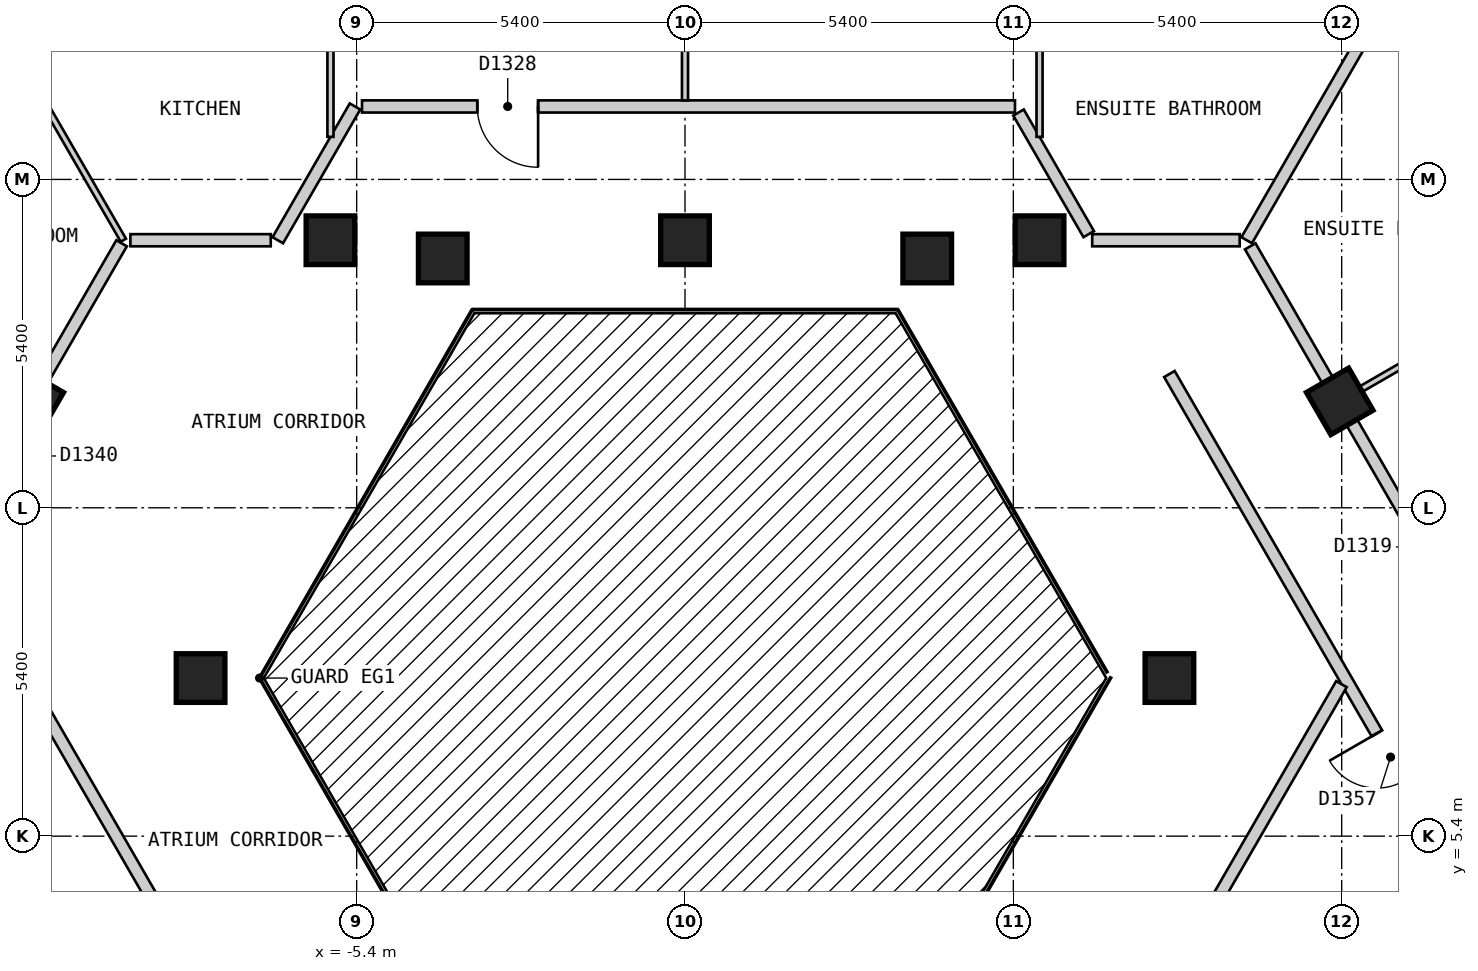
"""IFC4 building model, lengths in metres.
Left out: names, types, materials, properties, quantities, classifications, styles, units other than length and angle.
Written with IfcOpenShell. Run it as: python <this file> out.ifc"""

import sys

from ifc_helpers import new_model, si_unit, direction, frame, frame_2d, origin, origin_2d, place, context, subcontext, project, spatial, rectangle, extrude, element, fill, save


model = new_model("IFC4")
c1 = context("Model", 3, precision=1e-05, world=origin(), true_north=direction((0.0, 1.0)))
c2 = subcontext(c1, "Body", "Model", "MODEL_VIEW")
j1 = project(units=[si_unit("LENGTHUNIT", "METRE"), si_unit("PLANEANGLEUNIT", "RADIAN")], contexts=[c1])
p1 = place(None, origin())
s1 = spatial("IfcSite", under=j1, at=p1, CompositionType="ELEMENT")
p2 = place(p1, origin())
s2 = spatial("IfcBuilding", under=s1, at=p2, CompositionType="ELEMENT")
p3 = place(p2, frame((0.0, 0.0, 135.6)))
s3 = spatial("IfcBuildingStorey", under=s2, at=p3, CompositionType="ELEMENT", Elevation=135.6)
for number, where, z_axis, x_axis in (
    (1, (7.967, 8.0, 0.0), (0.0, 0.0, 1.0), (1.0, 0.0, 0.0)),
    (2, (10.768, 12.55, 0.0), (0.0, 0.0, 1.0), (-0.5, 0.866, 0.0)),
    (3, (5.831, 15.2, 0.0), (0.0, 0.0, 1.0), (-1.0, 0.0, 0.0)),
    (4, (3.984, 14.9, 0.0), (0.0, 0.0, 1.0), (1.0, 0.0, 0.0)),
    (5, (0.0, 15.2, 0.0), (0.0, 0.0, 1.0), (-1.0, 0.0, 0.0)),
    (6, (-3.984, 14.9, 0.0), (0.0, 0.0, 1.0), (1.0, 0.0, 0.0)),
    (7, (-5.831, 15.2, 0.0), (0.0, 0.0, 1.0), (-1.0, 0.0, 0.0)),
    (8, (-10.768, 12.55, 0.0), (0.0, 0.0, 1.0), (-0.5, -0.866, 0.0)),
    (9, (-7.967, 8.0, 0.0), (0.0, 0.0, 1.0), (1.0, 0.0, 0.0)),
):
    element("IfcColumn", number, at=place(p3, frame(where, z_axis=z_axis, x_axis=x_axis)), inside=s3, PredefinedType="COLUMN", context=c2, shape_type="SweptSolid", body=[
        extrude(rectangle(XDim=0.8, YDim=0.8, at=origin_2d()), origin(), (0.0, 0.0, 1.0), 3.0),
    ])
p4 = place(p3, frame((-10.796, 7.9, 0.0), z_axis=(0.0, 0.0, 1.0), x_axis=(0.499954271211, -0.866051803703, 0.0)))
e10 = element("IfcWall", 10, at=p4, inside=s3, PredefinedType="PARTITIONING", context=c2, shape_type="SweptSolid", body=[
    extrude(rectangle(XDim=7.536, YDim=0.2, at=frame_2d((3.768, 0.0))), origin(), (0.0, 0.0, 1.0), 2.7),
])
p5 = place(p3, frame((5.485, 17.3, 0.0), z_axis=(0.0, 0.0, 1.0), x_axis=(0.500027479704, -0.866009537788, 0.0)))
e11 = element("IfcWall", 11, at=p5, inside=s3, PredefinedType="PARTITIONING", context=c2, shape_type="SweptSolid", body=[
    extrude(rectangle(XDim=2.309, YDim=0.2, at=frame_2d((1.155, 0.0))), origin(), (0.0, 0.0, 1.0), 2.7),
])
p6 = place(p3, frame((7.967, 13.0, 0.0), z_axis=(0.0, 0.0, 1.0), x_axis=(0.50003774998, -0.866003607726, 0.0)))
e12 = element("IfcWall", 12, at=p6, inside=s3, PredefinedType="PARTITIONING", context=c2, shape_type="SweptSolid", body=[
    extrude(rectangle(XDim=14.433, YDim=0.2, at=frame_2d((7.217, 0.0))), origin(), (0.0, 0.0, 1.0), 2.7),
])
p7 = place(p6, frame((6.824, 0.0, 0.0)))
e13 = element("IfcOpeningElement", 13, at=p7, cuts=e12, PredefinedType="OPENING", context=c2, shape_type="SweptSolid", body=[
    extrude(rectangle(XDim=0.9, YDim=2.1, at=frame_2d((0.45, 1.05))), frame((0.0, 0.11, 0.0), z_axis=(0.0, -1.0, 0.0), x_axis=(1.0, 0.0, 0.0)), (0.0, 0.0, 1.0), 0.22),
])
p8 = place(p3, frame((9.296, 15.1, 0.0), z_axis=(0.0, 0.0, 1.0), x_axis=(0.499974024244, -0.866040400375, 0.0)))
e14 = element("IfcWall", 14, at=p8, inside=s3, PredefinedType="PARTITIONING", context=c2, shape_type="SweptSolid", body=[
    extrude(rectangle(XDim=16.857, YDim=0.2, at=frame_2d((8.429, 0.0))), origin(), (0.0, 0.0, 1.0), 2.7),
])
p9 = place(p8, frame((5.209, 0.0, 0.0)))
e15 = element("IfcOpeningElement", 15, at=p9, cuts=e14, PredefinedType="OPENING", context=c2, shape_type="SweptSolid", body=[
    extrude(rectangle(XDim=1.0, YDim=2.1, at=frame_2d((0.5, 1.05))), frame((0.0, 0.11, 0.0), z_axis=(0.0, -1.0, 0.0), x_axis=(1.0, 0.0, 0.0)), (0.0, 0.0, 1.0), 0.22),
])
p10 = place(p3, frame((-9.121, 15.2, 0.0), z_axis=(0.0, 0.0, 1.0), x_axis=(1.0, 0.0, 0.0)))
e16 = element("IfcWall", 16, at=p10, inside=s3, PredefinedType="PARTITIONING", context=c2, shape_type="SweptSolid", body=[
    extrude(rectangle(XDim=2.308, YDim=0.2, at=frame_2d((1.154, 0.0))), origin(), (0.0, 0.0, 1.0), 2.7),
])
p11 = place(p3, frame((6.697, 15.2, 0.0), z_axis=(0.0, 0.0, 1.0), x_axis=(1.0, 0.0, 0.0)))
e17 = element("IfcWall", 17, at=p11, inside=s3, PredefinedType="PARTITIONING", context=c2, shape_type="SweptSolid", body=[
    extrude(rectangle(XDim=2.425, YDim=0.2, at=frame_2d((1.212, 0.0))), origin(), (0.0, 0.0, 1.0), 2.7),
])
p12 = place(p3, frame((-5.312, 17.4, 0.0), z_axis=(0.0, 0.0, 1.0), x_axis=(1.0, 0.0, 0.0)))
e18 = element("IfcWall", 18, at=p12, inside=s3, PredefinedType="PARTITIONING", context=c2, shape_type="SweptSolid", body=[
    extrude(rectangle(XDim=10.739, YDim=0.2, at=frame_2d((5.37, 0.0))), origin(), (0.0, 0.0, 1.0), 2.7),
])
p13 = place(p12, frame((1.896, 0.0, 0.0)))
e19 = element("IfcOpeningElement", 19, at=p13, cuts=e18, PredefinedType="OPENING", context=c2, shape_type="SweptSolid", body=[
    extrude(rectangle(XDim=1.0, YDim=2.1, at=frame_2d((0.5, 1.05))), frame((0.0, 0.11, 0.0), z_axis=(0.0, -1.0, 0.0), x_axis=(1.0, 0.0, 0.0)), (0.0, 0.0, 1.0), 0.22),
])
p14 = place(p3, frame((7.028, 1.373, 0.0), z_axis=(0.0, 0.0, 1.0), x_axis=(0.499954271211, 0.866051803703, 0.0)))
e20 = element("IfcWall", 20, at=p14, inside=s3, PredefinedType="PARTITIONING", context=c2, shape_type="SweptSolid", body=[
    extrude(rectangle(XDim=7.536, YDim=0.2, at=frame_2d((3.768, 0.0))), origin(), (0.0, 0.0, 1.0), 2.7),
])
p15 = place(p3, frame((-6.697, 15.2, 0.0), z_axis=(0.0, 0.0, 1.0), x_axis=(0.499963722229, 0.866046347752, 0.0)))
e21 = element("IfcWall", 21, at=p15, inside=s3, PredefinedType="PARTITIONING", context=c2, shape_type="SweptSolid", body=[
    extrude(rectangle(XDim=2.54, YDim=0.2, at=frame_2d((1.27, 0.0))), origin(), (0.0, 0.0, 1.0), 2.7),
])
p16 = place(p3, frame((-17.724, 0.5, 0.0), z_axis=(0.0, 0.0, 1.0), x_axis=(0.499994801602, 0.86602840506, 0.0)))
e22 = element("IfcWall", 22, at=p16, inside=s3, PredefinedType="PARTITIONING", context=c2, shape_type="SweptSolid", body=[
    extrude(rectangle(XDim=16.916, YDim=0.2, at=frame_2d((8.458, 0.0))), origin(), (0.0, 0.0, 1.0), 2.7),
])
p17 = place(p16, frame((10.672, 0.0, 0.0)))
e23 = element("IfcOpeningElement", 23, at=p17, cuts=e22, PredefinedType="OPENING", context=c2, shape_type="SweptSolid", body=[
    extrude(rectangle(XDim=1.0, YDim=2.1, at=frame_2d((0.5, 1.05))), frame((0.0, 0.11, 0.0), z_axis=(0.0, -1.0, 0.0), x_axis=(1.0, 0.0, 0.0)), (0.0, 0.0, 1.0), 0.22),
])
p18 = place(p16, frame((5.187, 0.0, 0.0)))
e24 = element("IfcOpeningElement", 24, at=p18, cuts=e22, PredefinedType="OPENING", context=c2, shape_type="SweptSolid", body=[
    extrude(rectangle(XDim=1.0, YDim=2.1, at=frame_2d((0.5, 1.05))), frame((0.0, 0.11, 0.0), z_axis=(0.0, -1.0, 0.0), x_axis=(1.0, 0.0, 0.0)), (0.0, 0.0, 1.0), 0.22),
])
p19 = place(p16, frame((0.566, 0.0, 0.0)))
e25 = element("IfcOpeningElement", 25, at=p19, cuts=e22, PredefinedType="OPENING", context=c2, shape_type="SweptSolid", body=[
    extrude(rectangle(XDim=1.0, YDim=2.1, at=frame_2d((0.5, 1.05))), frame((0.0, 0.11, 0.0), z_axis=(0.0, -1.0, 0.0), x_axis=(1.0, 0.0, 0.0)), (0.0, 0.0, 1.0), 0.22),
])
p20 = place(p3, frame((-14.37, 24.09, 0.0), z_axis=(0.0, 0.0, 1.0), x_axis=(0.50002438799, -0.866011322914, 0.0)))
e26 = element("IfcWall", 26, at=p20, inside=s3, PredefinedType="PARTITIONING", context=c2, shape_type="SweptSolid", body=[
    extrude(rectangle(XDim=10.266, YDim=0.1, at=frame_2d((5.133, 0.0))), origin(), (0.0, 0.0, 1.0), 2.7),
])
p21 = place(p20, frame((2.347, 0.0, 0.0)))
e27 = element("IfcOpeningElement", 27, at=p21, cuts=e26, PredefinedType="OPENING", context=c2, shape_type="SweptSolid", body=[
    extrude(rectangle(XDim=0.9, YDim=2.1, at=frame_2d((0.45, 1.05))), frame((0.0, 0.06, 0.0), z_axis=(0.0, -1.0, 0.0), x_axis=(1.0, 0.0, 0.0)), (0.0, 0.0, 1.0), 0.12),
])
p22 = place(p3, frame((11.713, 19.313, 0.0), z_axis=(0.0, 0.0, 1.0), x_axis=(0.499999523185, -0.866025679073, 0.0)))
e28 = element("IfcWall", 28, at=p22, inside=s3, PredefinedType="PARTITIONING", context=c2, shape_type="SweptSolid", body=[
    extrude(rectangle(XDim=21.738, YDim=0.1, at=frame_2d((10.869, 0.0))), origin(), (0.0, 0.0, 1.0), 2.7),
])
p23 = place(p22, frame((7.654, 0.0, 0.0)))
e29 = element("IfcOpeningElement", 29, at=p23, cuts=e28, PredefinedType="OPENING", context=c2, shape_type="SweptSolid", body=[
    extrude(rectangle(XDim=0.9, YDim=2.1, at=frame_2d((0.45, 1.05))), frame((0.0, 0.06, 0.0), z_axis=(0.0, -1.0, 0.0), x_axis=(1.0, 0.0, 0.0)), (0.0, 0.0, 1.0), 0.12),
])
p24 = place(p22, frame((13.202, 0.0, 0.0)))
e30 = element("IfcOpeningElement", 30, at=p24, cuts=e28, PredefinedType="OPENING", context=c2, shape_type="SweptSolid", body=[
    extrude(rectangle(XDim=0.8, YDim=2.1, at=frame_2d((0.4, 1.05))), frame((0.0, 0.06, 0.0), z_axis=(0.0, -1.0, 0.0), x_axis=(1.0, 0.0, 0.0)), (0.0, 0.0, 1.0), 0.12),
])
p25 = place(p22, frame((2.242, 0.0, 0.0)))
e31 = element("IfcOpeningElement", 31, at=p25, cuts=e28, PredefinedType="OPENING", context=c2, shape_type="SweptSolid", body=[
    extrude(rectangle(XDim=0.8, YDim=2.1, at=frame_2d((0.4, 1.05))), frame((0.0, 0.06, 0.0), z_axis=(0.0, -1.0, 0.0), x_axis=(1.0, 0.0, 0.0)), (0.0, 0.0, 1.0), 0.12),
])
p26 = place(p22, frame((18.696, 0.0, 0.0)))
e32 = element("IfcOpeningElement", 32, at=p26, cuts=e28, PredefinedType="OPENING", context=c2, shape_type="SweptSolid", body=[
    extrude(rectangle(XDim=0.8, YDim=2.1, at=frame_2d((0.4, 1.05))), frame((0.0, 0.06, 0.0), z_axis=(0.0, -1.0, 0.0), x_axis=(1.0, 0.0, 0.0)), (0.0, 0.0, 1.0), 0.12),
])
p27 = place(p3, frame((5.831, 16.9, 0.0), z_axis=(0.0, 0.0, 1.0), x_axis=(0.0, 1.0, 0.0)))
e33 = element("IfcWall", 33, at=p27, inside=s3, PredefinedType="PARTITIONING", context=c2, shape_type="SweptSolid", body=[
    extrude(rectangle(XDim=4.546, YDim=0.1, at=frame_2d((2.273, 0.0))), origin(), (0.0, 0.0, 1.0), 2.7),
])
p28 = place(p3, frame((0.0, 17.5, 0.0), z_axis=(0.0, 0.0, 1.0), x_axis=(0.0, 1.0, 0.0)))
e34 = element("IfcWall", 34, at=p28, inside=s3, PredefinedType="PARTITIONING", context=c2, shape_type="SweptSolid", body=[
    extrude(rectangle(XDim=3.896, YDim=0.1, at=frame_2d((1.948, 0.0))), origin(), (0.0, 0.0, 1.0), 2.7),
])
p29 = place(p28, frame((1.523, 0.0, 0.0)))
e35 = element("IfcOpeningElement", 35, at=p29, cuts=e34, PredefinedType="OPENING", context=c2, shape_type="SweptSolid", body=[
    extrude(rectangle(XDim=0.8, YDim=2.1, at=frame_2d((0.4, 1.05))), frame((0.0, 0.06, 0.0), z_axis=(0.0, -1.0, 0.0), x_axis=(1.0, 0.0, 0.0)), (0.0, 0.0, 1.0), 0.12),
])
p30 = place(p3, frame((-5.831, 16.9, 0.0), z_axis=(0.0, 0.0, 1.0), x_axis=(0.0, 1.0, 0.0)))
e36 = element("IfcWall", 36, at=p30, inside=s3, PredefinedType="PARTITIONING", context=c2, shape_type="SweptSolid", body=[
    extrude(rectangle(XDim=4.546, YDim=0.1, at=frame_2d((2.273, 0.0))), origin(), (0.0, 0.0, 1.0), 2.7),
])
p31 = place(p30, frame((1.723, 0.0, 0.0)))
e37 = element("IfcOpeningElement", 37, at=p31, cuts=e36, PredefinedType="OPENING", context=c2, shape_type="SweptSolid", body=[
    extrude(rectangle(XDim=0.9, YDim=2.1, at=frame_2d((0.45, 1.05))), frame((0.0, 0.06, 0.0), z_axis=(0.0, -1.0, 0.0), x_axis=(1.0, 0.0, 0.0)), (0.0, 0.0, 1.0), 0.12),
])
p32 = place(p3, frame((10.854, 12.6, 0.0), z_axis=(0.0, 0.0, 1.0), x_axis=(0.86606561423, 0.499930346997, 0.0)))
e38 = element("IfcWall", 38, at=p32, inside=s3, PredefinedType="PARTITIONING", context=c2, shape_type="SweptSolid", body=[
    extrude(rectangle(XDim=4.1, YDim=0.1, at=frame_2d((2.05, 0.0))), origin(), (0.0, 0.0, 1.0), 2.7),
])
p33 = place(p3, frame((9.238, 15.2, 0.0), z_axis=(0.0, 0.0, 1.0), x_axis=(0.49993863487, 0.86606083006, 0.0)))
e39 = element("IfcWall", 39, at=p33, inside=s3, PredefinedType="PARTITIONING", context=c2, shape_type="SweptSolid", body=[
    extrude(rectangle(XDim=4.692, YDim=0.2, at=frame_2d((2.346, 0.0))), origin(), (0.0, 0.0, 1.0), 2.7),
])
p34 = place(p13, origin())
e40 = element("IfcDoor", 40, at=p34, inside=s3, OperationType="SINGLE_SWING_RIGHT", PredefinedType="DOOR", context=c2, shape_type="SweptSolid", body=[
    extrude(rectangle(XDim=1.0, YDim=2.1, at=frame_2d((0.5, 1.05))), frame((0.0, 0.025, 0.0), z_axis=(0.0, -1.0, 0.0), x_axis=(1.0, 0.0, 0.0)), (0.0, 0.0, 1.0), 0.05),
])
fill(e19, e40)
p35 = place(p7, origin())
e41 = element("IfcDoor", 41, at=p35, inside=s3, OperationType="SINGLE_SWING_LEFT", PredefinedType="DOOR", context=c2, shape_type="SweptSolid", body=[
    extrude(rectangle(XDim=0.9, YDim=2.1, at=frame_2d((0.45, 1.05))), frame((0.0, 0.025, 0.0), z_axis=(0.0, -1.0, 0.0), x_axis=(1.0, 0.0, 0.0)), (0.0, 0.0, 1.0), 0.05),
])
fill(e13, e41)
save(model, sys.argv[1])
